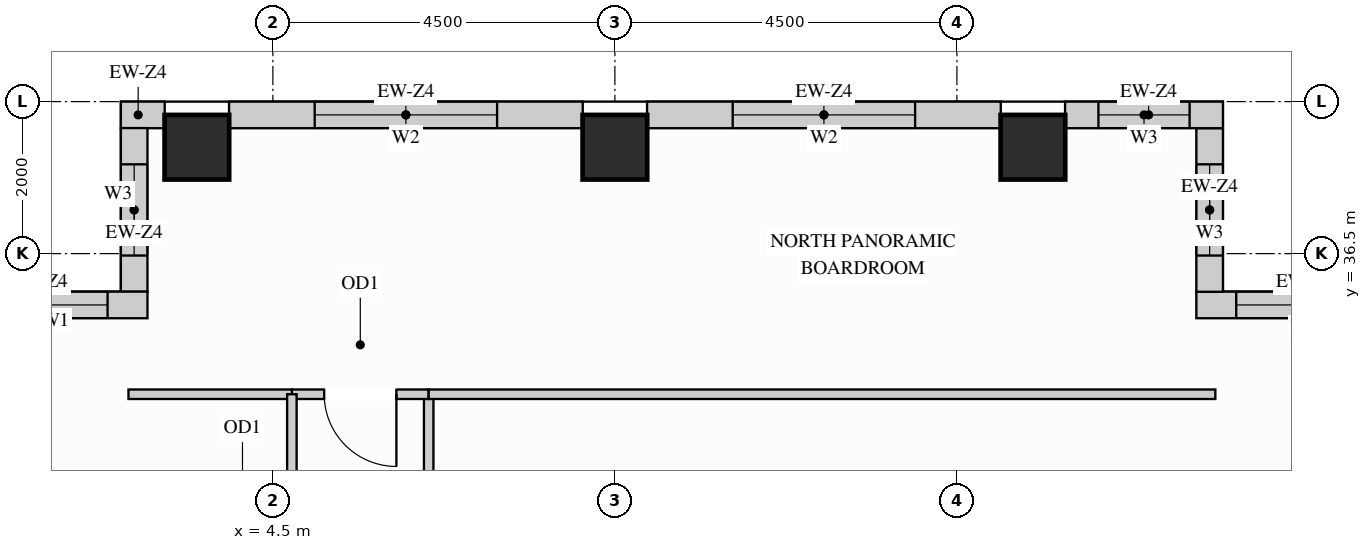
"""IFC4 building model, lengths in metres.
Left out: names, types, materials, properties, quantities, classifications, styles, units other than length and angle.
Written with IfcOpenShell. Run it as: python <this file> out.ifc"""

import sys

from ifc_helpers import new_model, si_unit, direction, frame, frame_2d, origin, origin_2d, place, context, subcontext, project, spatial, rectangle, extrude, source, transform, mapped, element, fill, save


model = new_model("IFC4")
c1 = context("Model", 3, precision=1e-05, world=origin(), true_north=direction((0.0, 1.0)))
c2 = subcontext(c1, "Body", "Model", "MODEL_VIEW")
j1 = project(units=[si_unit("LENGTHUNIT", "METRE"), si_unit("PLANEANGLEUNIT", "RADIAN")], contexts=[c1])
p1 = place(None, origin())
s1 = spatial("IfcSite", under=j1, at=p1, CompositionType="ELEMENT")
p2 = place(p1, origin())
s2 = spatial("IfcBuilding", under=s1, at=p2, CompositionType="ELEMENT")
p3 = place(p2, frame((0.0, 0.0, 219.6)))
s3 = spatial("IfcBuildingStorey", under=s2, at=p3, CompositionType="ELEMENT", Elevation=219.6)
m1 = source(origin(), c2, "Body", "SweptSolid", [
    extrude(rectangle(XDim=0.85, YDim=0.85, at=origin_2d()), origin(), (0.0, 0.0, 1.0), 3.4),
])
for number, where, z_axis, x_axis in (
    (1, (14.5, 37.9, 0.0), (0.0, 0.0, 1.0), (1.0, 0.0, 0.0)),
    (2, (3.5, 37.9, 0.0), (0.0, 0.0, 1.0), (1.0, 0.0, 0.0)),
    (3, (9.0, 37.9, 0.0), (0.0, 0.0, 1.0), (1.0, 0.0, 0.0)),
):
    element("IfcColumn", number, at=place(p3, frame(where, z_axis=z_axis, x_axis=x_axis)), inside=s3, PredefinedType="COLUMN", context=c2, shape_type="MappedRepresentation", body=[
        mapped(m1, transform((0.0, 0.0, 0.0), x_axis=(1.0, 0.0, 0.0), y_axis=(0.0, 1.0, 0.0), z_axis=(0.0, 0.0, 1.0))),
    ])
p4 = place(p3, frame((19.5, 35.825, 0.0), z_axis=(0.0, 0.0, 1.0), x_axis=(-1.0, 0.0, 0.0)))
e4 = element("IfcWall", 4, at=p4, inside=s3, PredefinedType="SOLIDWALL", context=c2, shape_type="SweptSolid", body=[
    extrude(rectangle(XDim=2.85, YDim=0.35, at=frame_2d((1.425, 0.0))), origin(), (0.0, 0.0, 1.0), 3.385),
])
p5 = place(p4, frame((0.525, 0.0, 0.78)))
e5 = element("IfcOpeningElement", 5, at=p5, cuts=e4, PredefinedType="OPENING", context=c2, shape_type="SweptSolid", body=[
    extrude(rectangle(XDim=1.8, YDim=2.1, at=frame_2d((0.9, 1.05))), frame((0.0, 0.185, 0.0), z_axis=(0.0, -1.0, 0.0), x_axis=(1.0, 0.0, 0.0)), (0.0, 0.0, 1.0), 0.37),
])
p6 = place(p3, frame((16.825, 35.998, 0.0), z_axis=(0.0, 0.0, 1.0), x_axis=(0.0, 1.0, 0.0)))
e6 = element("IfcWall", 6, at=p6, inside=s3, PredefinedType="SOLIDWALL", context=c2, shape_type="SweptSolid", body=[
    extrude(rectangle(XDim=2.154, YDim=0.35, at=frame_2d((1.077, 0.0))), origin(), (0.0, 0.0, 1.0), 3.385),
])
p7 = place(p6, frame((0.477, 0.0, 0.78)))
e7 = element("IfcOpeningElement", 7, at=p7, cuts=e6, PredefinedType="OPENING", context=c2, shape_type="SweptSolid", body=[
    extrude(rectangle(XDim=1.2, YDim=2.1, at=frame_2d((0.6, 1.05))), frame((0.0, 0.185, 0.0), z_axis=(0.0, -1.0, 0.0), x_axis=(1.0, 0.0, 0.0)), (0.0, 0.0, 1.0), 0.37),
])
p8 = place(p3, frame((17.0, 38.325, 0.0), z_axis=(0.0, 0.0, 1.0), x_axis=(-1.0, 0.0, 0.0)))
e8 = element("IfcWall", 8, at=p8, inside=s3, PredefinedType="SOLIDWALL", context=c2, shape_type="SweptSolid", body=[
    extrude(rectangle(XDim=2.077, YDim=0.35, at=frame_2d((1.039, 0.0))), origin(), (0.0, 0.0, 1.0), 3.385),
])
p9 = place(p8, frame((0.438, 0.0, 0.78)))
e9 = element("IfcOpeningElement", 9, at=p9, cuts=e8, PredefinedType="OPENING", context=c2, shape_type="SweptSolid", body=[
    extrude(rectangle(XDim=1.2, YDim=2.1, at=frame_2d((0.6, 1.05))), frame((0.0, 0.185, 0.0), z_axis=(0.0, -1.0, 0.0), x_axis=(1.0, 0.0, 0.0)), (0.0, 0.0, 1.0), 0.37),
])
p10 = place(p3, frame((14.077, 38.325, 0.0), z_axis=(0.0, 0.0, 1.0), x_axis=(-1.0, 0.0, 0.0)))
e10 = element("IfcWall", 10, at=p10, inside=s3, PredefinedType="SOLIDWALL", context=c2, shape_type="SweptSolid", body=[
    extrude(rectangle(XDim=4.654, YDim=0.35, at=frame_2d((2.327, 0.0))), origin(), (0.0, 0.0, 1.0), 3.385),
])
p11 = place(p10, frame((1.127, 0.0, 0.78)))
e11 = element("IfcOpeningElement", 11, at=p11, cuts=e10, PredefinedType="OPENING", context=c2, shape_type="SweptSolid", body=[
    extrude(rectangle(XDim=2.4, YDim=2.1, at=frame_2d((1.2, 1.05))), frame((0.0, 0.185, 0.0), z_axis=(0.0, -1.0, 0.0), x_axis=(1.0, 0.0, 0.0)), (0.0, 0.0, 1.0), 0.37),
])
p12 = place(p3, frame((8.577, 38.325, 0.0), z_axis=(0.0, 0.0, 1.0), x_axis=(-1.0, 0.0, 0.0)))
e12 = element("IfcWall", 12, at=p12, inside=s3, PredefinedType="SOLIDWALL", context=c2, shape_type="SweptSolid", body=[
    extrude(rectangle(XDim=4.654, YDim=0.35, at=frame_2d((2.327, 0.0))), origin(), (0.0, 0.0, 1.0), 3.385),
])
p13 = place(p12, frame((1.127, 0.0, 0.78)))
e13 = element("IfcOpeningElement", 13, at=p13, cuts=e12, PredefinedType="OPENING", context=c2, shape_type="SweptSolid", body=[
    extrude(rectangle(XDim=2.4, YDim=2.1, at=frame_2d((1.2, 1.05))), frame((0.0, 0.185, 0.0), z_axis=(0.0, -1.0, 0.0), x_axis=(1.0, 0.0, 0.0)), (0.0, 0.0, 1.0), 0.37),
])
m2 = source(origin(), c2, "Body", "SweptSolid", [
    extrude(rectangle(XDim=0.577, YDim=0.35, at=frame_2d((0.289, 0.0))), origin(), (0.0, 0.0, 1.0), 3.385),
])
p14 = place(p3, frame((3.077, 38.325, 0.0), z_axis=(0.0, 0.0, 1.0), x_axis=(-1.0, 0.0, 0.0)))
e14 = element("IfcWall", 14, at=p14, inside=s3, PredefinedType="SOLIDWALL", context=c2, shape_type="MappedRepresentation", body=[
    mapped(m2, transform((0.0, 0.0, 0.0), x_axis=(1.0, 0.0, 0.0), y_axis=(0.0, 1.0, 0.0), z_axis=(0.0, 0.0, 1.0))),
])
p15 = place(p3, frame((2.675, 38.152, 0.0), z_axis=(0.0, 0.0, 1.0), x_axis=(0.0, -1.0, 0.0)))
e15 = element("IfcWall", 15, at=p15, inside=s3, PredefinedType="SOLIDWALL", context=c2, shape_type="SweptSolid", body=[
    extrude(rectangle(XDim=2.154, YDim=0.35, at=frame_2d((1.077, 0.0))), origin(), (0.0, 0.0, 1.0), 3.385),
])
p16 = place(p15, frame((0.477, 0.0, 0.78)))
e16 = element("IfcOpeningElement", 16, at=p16, cuts=e15, PredefinedType="OPENING", context=c2, shape_type="SweptSolid", body=[
    extrude(rectangle(XDim=1.2, YDim=2.1, at=frame_2d((0.6, 1.05))), frame((0.0, 0.185, 0.0), z_axis=(0.0, -1.0, 0.0), x_axis=(1.0, 0.0, 0.0)), (0.0, 0.0, 1.0), 0.37),
])
p17 = place(p3, frame((2.85, 35.825, 0.0), z_axis=(0.0, 0.0, 1.0), x_axis=(-1.0, 0.0, 0.0)))
e17 = element("IfcWall", 17, at=p17, inside=s3, PredefinedType="SOLIDWALL", context=c2, shape_type="SweptSolid", body=[
    extrude(rectangle(XDim=2.85, YDim=0.35, at=frame_2d((1.425, 0.0))), origin(), (0.0, 0.0, 1.0), 3.385),
])
p18 = place(p17, frame((0.525, 0.0, 0.78)))
e18 = element("IfcOpeningElement", 18, at=p18, cuts=e17, PredefinedType="OPENING", context=c2, shape_type="SweptSolid", body=[
    extrude(rectangle(XDim=1.8, YDim=2.1, at=frame_2d((0.9, 1.05))), frame((0.0, 0.185, 0.0), z_axis=(0.0, -1.0, 0.0), x_axis=(1.0, 0.0, 0.0)), (0.0, 0.0, 1.0), 0.37),
])
p19 = place(p3, frame((6.55, 31.55, 0.0), z_axis=(0.0, 0.0, 1.0), x_axis=(0.0, 1.0, 0.0)))
e19 = element("IfcWall", 19, at=p19, inside=s3, PredefinedType="PARTITIONING", context=c2, shape_type="SweptSolid", body=[
    extrude(rectangle(XDim=3.1, YDim=0.125, at=frame_2d((1.55, 0.0))), origin(), (0.0, 0.0, 1.0), 3.385),
])
p20 = place(p19, frame((1.075, 0.0, 0.0)))
e20 = element("IfcOpeningElement", 20, at=p20, cuts=e19, PredefinedType="OPENING", context=c2, shape_type="SweptSolid", body=[
    extrude(rectangle(XDim=0.95, YDim=2.15, at=frame_2d((0.475, 1.075))), frame((0.0, 0.073, 0.0), z_axis=(0.0, -1.0, 0.0), x_axis=(1.0, 0.0, 0.0)), (0.0, 0.0, 1.0), 0.145),
])
p21 = place(p3, frame((4.75, 34.65, 0.0), z_axis=(0.0, 0.0, 1.0), x_axis=(1.0, 0.0, 0.0)))
e21 = element("IfcWall", 21, at=p21, inside=s3, PredefinedType="PARTITIONING", context=c2, shape_type="SweptSolid", body=[
    extrude(rectangle(XDim=1.8, YDim=0.125, at=frame_2d((0.9, 0.0))), origin(), (0.0, 0.0, 1.0), 2.448),
])
p22 = place(p21, frame((0.425, 0.0, 0.0)))
e22 = element("IfcOpeningElement", 22, at=p22, cuts=e21, PredefinedType="OPENING", context=c2, shape_type="SweptSolid", body=[
    extrude(rectangle(XDim=0.95, YDim=2.15, at=frame_2d((0.475, 1.075))), frame((0.0, 0.073, 0.0), z_axis=(0.0, -1.0, 0.0), x_axis=(1.0, 0.0, 0.0)), (0.0, 0.0, 1.0), 0.145),
])
m3 = source(origin(), c2, "Body", "SweptSolid", [
    extrude(rectangle(XDim=10.35, YDim=0.125, at=frame_2d((5.175, 0.0))), origin(), (0.0, 0.0, 1.0), 2.448),
])
p23 = place(p3, frame((6.55, 34.65, 0.0), z_axis=(0.0, 0.0, 1.0), x_axis=(1.0, 0.0, 0.0)))
e23 = element("IfcWall", 23, at=p23, inside=s3, PredefinedType="PARTITIONING", context=c2, shape_type="MappedRepresentation", body=[
    mapped(m3, transform((0.0, 0.0, 0.0), x_axis=(1.0, 0.0, 0.0), y_axis=(0.0, 1.0, 0.0), z_axis=(0.0, 0.0, 1.0))),
])
m4 = source(origin(), c2, "Body", "SweptSolid", [
    extrude(rectangle(XDim=2.15, YDim=0.125, at=frame_2d((1.075, 0.0))), origin(), (0.0, 0.0, 1.0), 2.448),
])
p24 = place(p3, frame((2.6, 34.65, 0.0), z_axis=(0.0, 0.0, 1.0), x_axis=(1.0, 0.0, 0.0)))
e24 = element("IfcWall", 24, at=p24, inside=s3, PredefinedType="PARTITIONING", context=c2, shape_type="MappedRepresentation", body=[
    mapped(m4, transform((0.0, 0.0, 0.0), x_axis=(1.0, 0.0, 0.0), y_axis=(0.0, 1.0, 0.0), z_axis=(0.0, 0.0, 1.0))),
])
p25 = place(p3, frame((4.75, 31.55, 0.0), z_axis=(0.0, 0.0, 1.0), x_axis=(0.0, 1.0, 0.0)))
e25 = element("IfcWall", 25, at=p25, inside=s3, PredefinedType="PARTITIONING", context=c2, shape_type="SweptSolid", body=[
    extrude(rectangle(XDim=3.1, YDim=0.125, at=frame_2d((1.55, 0.0))), origin(), (0.0, 0.0, 1.0), 3.385),
])
p26 = place(p25, frame((1.075, 0.0, 0.0)))
e26 = element("IfcOpeningElement", 26, at=p26, cuts=e25, PredefinedType="OPENING", context=c2, shape_type="SweptSolid", body=[
    extrude(rectangle(XDim=0.95, YDim=2.15, at=frame_2d((0.475, 1.075))), frame((0.0, 0.073, 0.0), z_axis=(0.0, -1.0, 0.0), x_axis=(1.0, 0.0, 0.0)), (0.0, 0.0, 1.0), 0.145),
])
m5 = source(origin(), c2, "Body", "SweptSolid", [
    extrude(rectangle(XDim=0.95, YDim=2.15, at=frame_2d((0.475, 1.075))), frame((0.0, 0.025, 0.0), z_axis=(0.0, -1.0, 0.0), x_axis=(1.0, 0.0, 0.0)), (0.0, 0.0, 1.0), 0.05),
])
p27 = place(p22, origin())
e27 = element("IfcDoor", 27, at=p27, inside=s3, OperationType="SINGLE_SWING_RIGHT", PredefinedType="DOOR", context=c2, shape_type="MappedRepresentation", body=[
    mapped(m5, transform((0.0, 0.0, 0.0), x_axis=(1.0, 0.0, 0.0), y_axis=(0.0, 1.0, 0.0), z_axis=(0.0, 0.0, 1.0))),
])
fill(e22, e27)
m6 = source(origin(), c2, "Body", "SweptSolid", [
    extrude(rectangle(XDim=1.8, YDim=2.1, at=frame_2d((0.9, 1.05))), frame((0.0, 0.03, 0.0), z_axis=(0.0, -1.0, 0.0), x_axis=(1.0, 0.0, 0.0)), (0.0, 0.0, 1.0), 0.06),
])
p28 = place(p5, origin())
e28 = element("IfcWindow", 28, at=p28, inside=s3, PartitioningType="SINGLE_PANEL", PredefinedType="WINDOW", context=c2, shape_type="MappedRepresentation", body=[
    mapped(m6, transform((0.0, 0.0, 0.0), x_axis=(1.0, 0.0, 0.0), y_axis=(0.0, 1.0, 0.0), z_axis=(0.0, 0.0, 1.0))),
])
fill(e5, e28)
p29 = place(p18, origin())
e29 = element("IfcWindow", 29, at=p29, inside=s3, PartitioningType="SINGLE_PANEL", PredefinedType="WINDOW", context=c2, shape_type="MappedRepresentation", body=[
    mapped(m6, transform((0.0, 0.0, 0.0), x_axis=(1.0, 0.0, 0.0), y_axis=(0.0, 1.0, 0.0), z_axis=(0.0, 0.0, 1.0))),
])
fill(e18, e29)
m7 = source(origin(), c2, "Body", "SweptSolid", [
    extrude(rectangle(XDim=2.4, YDim=2.1, at=frame_2d((1.2, 1.05))), frame((0.0, 0.03, 0.0), z_axis=(0.0, -1.0, 0.0), x_axis=(1.0, 0.0, 0.0)), (0.0, 0.0, 1.0), 0.06),
])
p30 = place(p11, origin())
e30 = element("IfcWindow", 30, at=p30, inside=s3, PartitioningType="SINGLE_PANEL", PredefinedType="WINDOW", context=c2, shape_type="MappedRepresentation", body=[
    mapped(m7, transform((0.0, 0.0, 0.0), x_axis=(1.0, 0.0, 0.0), y_axis=(0.0, 1.0, 0.0), z_axis=(0.0, 0.0, 1.0))),
])
fill(e11, e30)
p31 = place(p13, origin())
e31 = element("IfcWindow", 31, at=p31, inside=s3, PartitioningType="SINGLE_PANEL", PredefinedType="WINDOW", context=c2, shape_type="MappedRepresentation", body=[
    mapped(m7, transform((0.0, 0.0, 0.0), x_axis=(1.0, 0.0, 0.0), y_axis=(0.0, 1.0, 0.0), z_axis=(0.0, 0.0, 1.0))),
])
fill(e13, e31)
m8 = source(origin(), c2, "Body", "SweptSolid", [
    extrude(rectangle(XDim=1.2, YDim=2.1, at=frame_2d((0.6, 1.05))), frame((0.0, 0.03, 0.0), z_axis=(0.0, -1.0, 0.0), x_axis=(1.0, 0.0, 0.0)), (0.0, 0.0, 1.0), 0.06),
])
p32 = place(p7, origin())
e32 = element("IfcWindow", 32, at=p32, inside=s3, PartitioningType="SINGLE_PANEL", PredefinedType="WINDOW", context=c2, shape_type="MappedRepresentation", body=[
    mapped(m8, transform((0.0, 0.0, 0.0), x_axis=(1.0, 0.0, 0.0), y_axis=(0.0, 1.0, 0.0), z_axis=(0.0, 0.0, 1.0))),
])
fill(e7, e32)
p33 = place(p9, origin())
e33 = element("IfcWindow", 33, at=p33, inside=s3, PartitioningType="SINGLE_PANEL", PredefinedType="WINDOW", context=c2, shape_type="MappedRepresentation", body=[
    mapped(m8, transform((0.0, 0.0, 0.0), x_axis=(1.0, 0.0, 0.0), y_axis=(0.0, 1.0, 0.0), z_axis=(0.0, 0.0, 1.0))),
])
fill(e9, e33)
p34 = place(p16, origin())
e34 = element("IfcWindow", 34, at=p34, inside=s3, PartitioningType="SINGLE_PANEL", PredefinedType="WINDOW", context=c2, shape_type="MappedRepresentation", body=[
    mapped(m8, transform((0.0, 0.0, 0.0), x_axis=(1.0, 0.0, 0.0), y_axis=(0.0, 1.0, 0.0), z_axis=(0.0, 0.0, 1.0))),
])
fill(e16, e34)
save(model, sys.argv[1])
